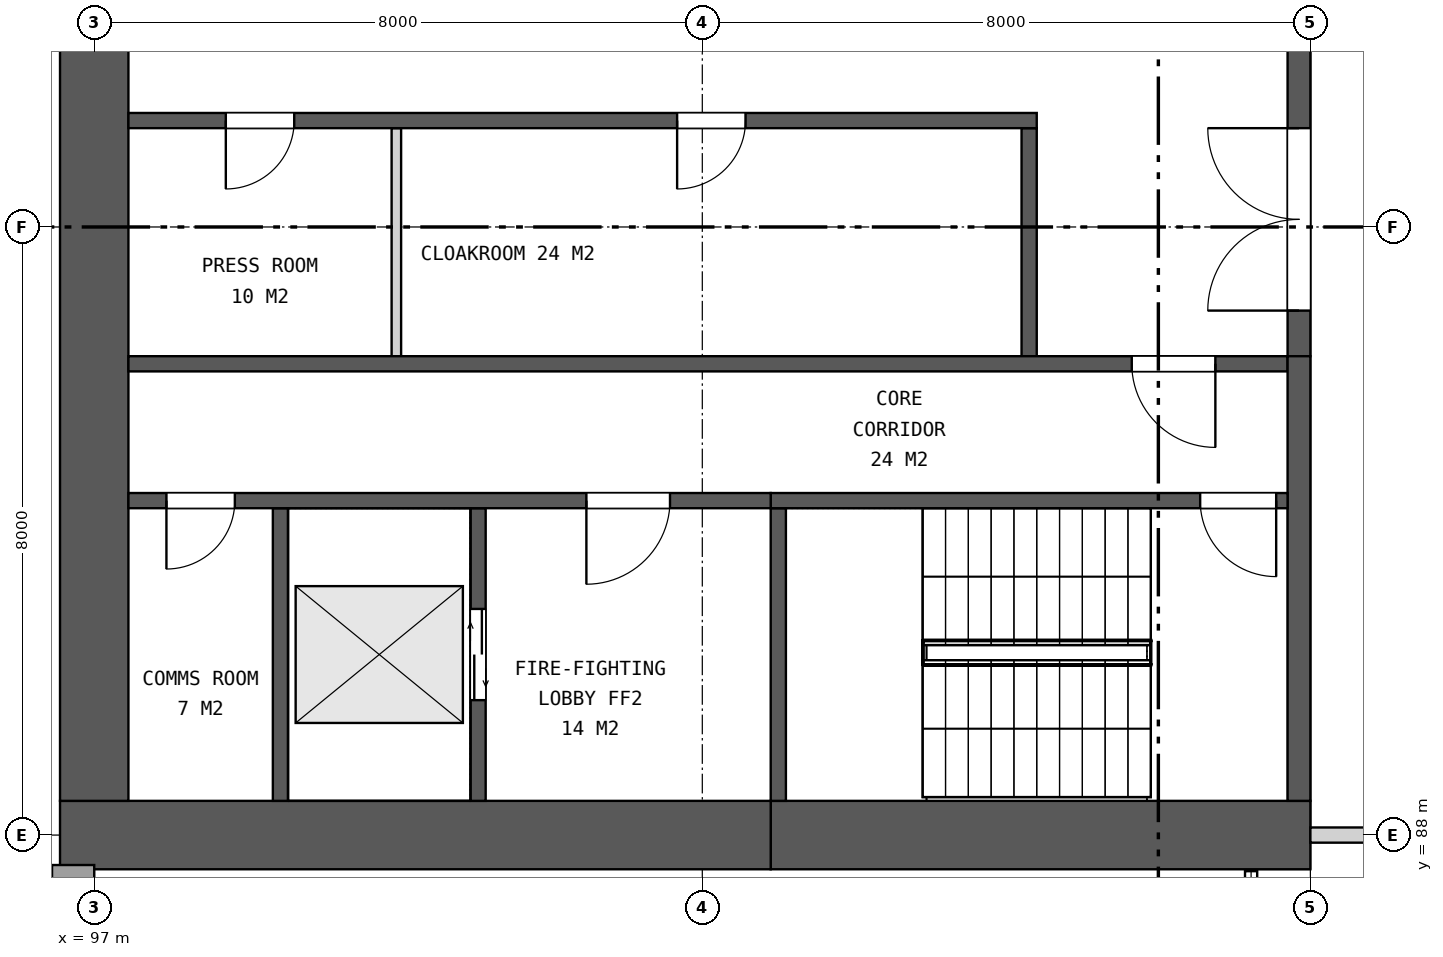
"""IFC4 building model, lengths in metres.
Left out: names, types, materials, properties, quantities, classifications, styles, units other than length and angle.
Written with IfcOpenShell. Run it as: python <this file> out.ifc"""

import sys

from ifc_helpers import new_model, si_unit, direction, frame, frame_2d, origin, place, context, subcontext, project, spatial, rectangle, extrude, element, fill, save


model = new_model("IFC4")
c1 = context("Model", 3, precision=1e-05, world=origin(), true_north=direction((0.0, 1.0)))
c2 = subcontext(c1, "Body", "Model", "MODEL_VIEW")
j1 = project(units=[si_unit("LENGTHUNIT", "METRE"), si_unit("PLANEANGLEUNIT", "RADIAN")], contexts=[c1])
p1 = place(None, origin())
s1 = spatial("IfcSite", under=j1, at=p1, CompositionType="ELEMENT")
p2 = place(p1, origin())
s2 = spatial("IfcBuilding", under=s1, at=p2, CompositionType="ELEMENT")
p3 = place(p2, frame((0.0, 0.0, 41.5)))
s3 = spatial("IfcBuildingStorey", under=s2, at=p3, CompositionType="ELEMENT", Elevation=41.5)
p4 = place(p3, frame((113.0, 88.0, 0.0), z_axis=(0.0, 0.0, 1.0), x_axis=(-1.0, 0.0, 0.0)))
e1 = element("IfcWall", 1, at=p4, inside=s3, PredefinedType="SHEAR", context=c2, shape_type="SweptSolid", body=[
    extrude(rectangle(XDim=7.1, YDim=0.9, at=frame_2d((3.55, 0.0))), origin(), (0.0, 0.0, 1.0), 6.0),
])
p5 = place(p3, frame((105.9, 88.0, 0.0), z_axis=(0.0, 0.0, 1.0), x_axis=(-1.0, 0.0, 0.0)))
e2 = element("IfcWall", 2, at=p5, inside=s3, PredefinedType="SHEAR", context=c2, shape_type="SweptSolid", body=[
    extrude(rectangle(XDim=9.35, YDim=0.9, at=frame_2d((4.675, 0.0))), origin(), (0.0, 0.0, 1.0), 6.0),
])
p6 = place(p3, frame((97.0, 111.55, 0.0), z_axis=(0.0, 0.0, 1.0), x_axis=(0.0, -1.0, 0.0)))
e3 = element("IfcWall", 3, at=p6, inside=s3, PredefinedType="SHEAR", context=c2, shape_type="SweptSolid", body=[
    extrude(rectangle(XDim=23.1, YDim=0.9, at=frame_2d((11.55, 0.0))), origin(), (0.0, 0.0, 1.0), 6.0),
])
p7 = place(p6, frame((10.35, 0.0, 0.0)))
e4 = element("IfcOpeningElement", 4, at=p7, cuts=e3, PredefinedType="OPENING", context=c2, shape_type="SweptSolid", body=[
    extrude(rectangle(XDim=2.4, YDim=2.4, at=frame_2d((1.2, 1.2))), frame((0.0, 0.46, 0.0), z_axis=(0.0, -1.0, 0.0), x_axis=(1.0, 0.0, 0.0)), (0.0, 0.0, 1.0), 0.92),
])
p8 = place(p3, frame((112.85, 105.7, 0.0), z_axis=(0.0, 0.0, 1.0), x_axis=(0.0, -1.0, 0.0)))
e5 = element("IfcWall", 5, at=p8, inside=s3, PredefinedType="SHEAR", context=c2, shape_type="SweptSolid", body=[
    extrude(rectangle(XDim=11.4, YDim=0.3, at=frame_2d((5.7, 0.0))), origin(), (0.0, 0.0, 1.0), 6.0),
])
p9 = place(p8, frame((0.6, 0.0, 0.0)))
e6 = element("IfcOpeningElement", 6, at=p9, cuts=e5, PredefinedType="OPENING", context=c2, shape_type="SweptSolid", body=[
    extrude(rectangle(XDim=2.4, YDim=2.4, at=frame_2d((1.2, 1.2))), frame((0.0, 0.16, 0.0), z_axis=(0.0, -1.0, 0.0), x_axis=(1.0, 0.0, 0.0)), (0.0, 0.0, 1.0), 0.32),
])
p10 = place(p8, frame((4.5, 0.0, 0.0)))
e7 = element("IfcOpeningElement", 7, at=p10, cuts=e5, PredefinedType="OPENING", context=c2, shape_type="SweptSolid", body=[
    extrude(rectangle(XDim=2.4, YDim=2.4, at=frame_2d((1.2, 1.2))), frame((0.0, 0.16, 0.0), z_axis=(0.0, -1.0, 0.0), x_axis=(1.0, 0.0, 0.0)), (0.0, 0.0, 1.0), 0.32),
])
p11 = place(p8, frame((8.4, 0.0, 0.0)))
e8 = element("IfcOpeningElement", 8, at=p11, cuts=e5, PredefinedType="OPENING", context=c2, shape_type="SweptSolid", body=[
    extrude(rectangle(XDim=2.4, YDim=2.4, at=frame_2d((1.2, 1.2))), frame((0.0, 0.16, 0.0), z_axis=(0.0, -1.0, 0.0), x_axis=(1.0, 0.0, 0.0)), (0.0, 0.0, 1.0), 0.32),
])
p12 = place(p3, frame((109.3, 97.3, 0.0), z_axis=(0.0, 0.0, 1.0), x_axis=(0.0, -1.0, 0.0)))
e9 = element("IfcWall", 9, at=p12, inside=s3, PredefinedType="SHEAR", context=c2, shape_type="SweptSolid", body=[
    extrude(rectangle(XDim=3.0, YDim=0.2, at=frame_2d((1.5, 0.0))), origin(), (0.0, 0.0, 1.0), 6.0),
])
p13 = place(p3, frame((100.975, 97.3, 0.0), z_axis=(0.0, 0.0, 1.0), x_axis=(0.0, -1.0, 0.0)))
e10 = element("IfcWall", 10, at=p13, inside=s3, PredefinedType="PARTITIONING", context=c2, shape_type="SweptSolid", body=[
    extrude(rectangle(XDim=3.0, YDim=0.125, at=frame_2d((1.5, 0.0))), origin(), (0.0, 0.0, 1.0), 6.0),
])
p14 = place(p3, frame((109.4, 97.4, 0.0), z_axis=(0.0, 0.0, 1.0), x_axis=(-1.0, 0.0, 0.0)))
e11 = element("IfcWall", 11, at=p14, inside=s3, PredefinedType="SHEAR", context=c2, shape_type="SweptSolid", body=[
    extrude(rectangle(XDim=11.95, YDim=0.2, at=frame_2d((5.975, 0.0))), origin(), (0.0, 0.0, 1.0), 6.0),
])
p15 = place(p14, frame((3.831, 0.0, 0.0)))
e12 = element("IfcOpeningElement", 12, at=p15, cuts=e11, PredefinedType="OPENING", context=c2, shape_type="SweptSolid", body=[
    extrude(rectangle(XDim=0.9, YDim=2.1, at=frame_2d((0.45, 1.05))), frame((0.0, 0.11, 0.0), z_axis=(0.0, -1.0, 0.0), x_axis=(1.0, 0.0, 0.0)), (0.0, 0.0, 1.0), 0.22),
])
p16 = place(p14, frame((9.769, 0.0, 0.0)))
e13 = element("IfcOpeningElement", 13, at=p16, cuts=e11, PredefinedType="OPENING", context=c2, shape_type="SweptSolid", body=[
    extrude(rectangle(XDim=0.9, YDim=2.1, at=frame_2d((0.45, 1.05))), frame((0.0, 0.11, 0.0), z_axis=(0.0, -1.0, 0.0), x_axis=(1.0, 0.0, 0.0)), (0.0, 0.0, 1.0), 0.22),
])
p17 = place(p3, frame((112.7, 94.2, 0.0), z_axis=(0.0, 0.0, 1.0), x_axis=(-1.0, 0.0, 0.0)))
e14 = element("IfcWall", 14, at=p17, inside=s3, PredefinedType="SHEAR", context=c2, shape_type="SweptSolid", body=[
    extrude(rectangle(XDim=15.25, YDim=0.2, at=frame_2d((7.625, 0.0))), origin(), (0.0, 0.0, 1.0), 6.0),
])
p18 = place(p17, frame((0.95, 0.0, 0.0)))
e15 = element("IfcOpeningElement", 15, at=p18, cuts=e14, PredefinedType="OPENING", context=c2, shape_type="SweptSolid", body=[
    extrude(rectangle(XDim=1.1, YDim=2.1, at=frame_2d((0.55, 1.05))), frame((0.0, 0.11, 0.0), z_axis=(0.0, -1.0, 0.0), x_axis=(1.0, 0.0, 0.0)), (0.0, 0.0, 1.0), 0.22),
])
p19 = place(p3, frame((112.85, 94.3, 0.0), z_axis=(0.0, 0.0, 1.0), x_axis=(0.0, -1.0, 0.0)))
e16 = element("IfcWall", 16, at=p19, inside=s3, PredefinedType="SHEAR", context=c2, shape_type="SweptSolid", body=[
    extrude(rectangle(XDim=5.85, YDim=0.3, at=frame_2d((2.925, 0.0))), origin(), (0.0, 0.0, 1.0), 6.0),
])
p20 = place(p3, frame((106.0, 92.3, 0.0), z_axis=(0.0, 0.0, 1.0), x_axis=(0.0, -1.0, 0.0)))
e17 = element("IfcWall", 17, at=p20, inside=s3, PredefinedType="SHEAR", context=c2, shape_type="SweptSolid", body=[
    extrude(rectangle(XDim=3.85, YDim=0.2, at=frame_2d((1.925, 0.0))), origin(), (0.0, 0.0, 1.0), 6.0),
])
p21 = place(p3, frame((102.05, 92.3, 0.0), z_axis=(0.0, 0.0, 1.0), x_axis=(0.0, -1.0, 0.0)))
e18 = element("IfcWall", 18, at=p21, inside=s3, PredefinedType="SHEAR", context=c2, shape_type="SweptSolid", body=[
    extrude(rectangle(XDim=3.85, YDim=0.2, at=frame_2d((1.925, 0.0))), origin(), (0.0, 0.0, 1.0), 6.0),
])
p22 = place(p21, frame((1.325, 0.0, 0.0)))
e19 = element("IfcOpeningElement", 19, at=p22, cuts=e18, PredefinedType="OPENING", context=c2, shape_type="SweptSolid", body=[
    extrude(rectangle(XDim=1.2, YDim=2.1, at=frame_2d((0.6, 1.05))), frame((0.0, 0.11, 0.0), z_axis=(0.0, -1.0, 0.0), x_axis=(1.0, 0.0, 0.0)), (0.0, 0.0, 1.0), 0.22),
])
p23 = place(p3, frame((99.45, 92.3, 0.0), z_axis=(0.0, 0.0, 1.0), x_axis=(0.0, -1.0, 0.0)))
e20 = element("IfcWall", 20, at=p23, inside=s3, PredefinedType="SHEAR", context=c2, shape_type="SweptSolid", body=[
    extrude(rectangle(XDim=3.85, YDim=0.2, at=frame_2d((1.925, 0.0))), origin(), (0.0, 0.0, 1.0), 6.0),
])
p24 = place(p3, frame((112.7, 92.4, 0.0), z_axis=(0.0, 0.0, 1.0), x_axis=(-1.0, 0.0, 0.0)))
e21 = element("IfcWall", 21, at=p24, inside=s3, PredefinedType="SHEAR", context=c2, shape_type="SweptSolid", body=[
    extrude(rectangle(XDim=6.8, YDim=0.2, at=frame_2d((3.4, 0.0))), origin(), (0.0, 0.0, 1.0), 6.0),
])
p25 = place(p24, frame((0.15, 0.0, 0.0)))
e22 = element("IfcOpeningElement", 22, at=p25, cuts=e21, PredefinedType="OPENING", context=c2, shape_type="SweptSolid", body=[
    extrude(rectangle(XDim=1.0, YDim=2.1, at=frame_2d((0.5, 1.05))), frame((0.0, 0.11, 0.0), z_axis=(0.0, -1.0, 0.0), x_axis=(1.0, 0.0, 0.0)), (0.0, 0.0, 1.0), 0.22),
])
p26 = place(p3, frame((105.9, 92.4, 0.0), z_axis=(0.0, 0.0, 1.0), x_axis=(-1.0, 0.0, 0.0)))
e23 = element("IfcWall", 23, at=p26, inside=s3, PredefinedType="SHEAR", context=c2, shape_type="SweptSolid", body=[
    extrude(rectangle(XDim=8.45, YDim=0.2, at=frame_2d((4.225, 0.0))), origin(), (0.0, 0.0, 1.0), 6.0),
])
p27 = place(p26, frame((1.325, 0.0, 0.0)))
e24 = element("IfcOpeningElement", 24, at=p27, cuts=e23, PredefinedType="OPENING", context=c2, shape_type="SweptSolid", body=[
    extrude(rectangle(XDim=1.1, YDim=2.1, at=frame_2d((0.55, 1.05))), frame((0.0, 0.11, 0.0), z_axis=(0.0, -1.0, 0.0), x_axis=(1.0, 0.0, 0.0)), (0.0, 0.0, 1.0), 0.22),
])
p28 = place(p26, frame((7.05, 0.0, 0.0)))
e25 = element("IfcOpeningElement", 25, at=p28, cuts=e23, PredefinedType="OPENING", context=c2, shape_type="SweptSolid", body=[
    extrude(rectangle(XDim=0.9, YDim=2.1, at=frame_2d((0.45, 1.05))), frame((0.0, 0.11, 0.0), z_axis=(0.0, -1.0, 0.0), x_axis=(1.0, 0.0, 0.0)), (0.0, 0.0, 1.0), 0.22),
])
p29 = place(p3, frame((96.445, 87.453, 0.0), z_axis=(0.0, 0.0, 1.0), x_axis=(1.0, 0.0, 0.0)))
e26 = element("IfcWall", 26, at=p29, inside=s3, PredefinedType="SOLIDWALL", context=c2, shape_type="SweptSolid", body=[
    extrude(rectangle(XDim=0.555, YDim=0.306, at=frame_2d((0.277, 0.0))), origin(), (0.0, 0.0, 1.0), 5.6),
])
p30 = place(p3, frame((113.0, 88.0, 0.0), z_axis=(0.0, 0.0, 1.0), x_axis=(1.0, 0.0, 0.0)))
e27 = element("IfcWall", 27, at=p30, inside=s3, PredefinedType="PARTITIONING", context=c2, shape_type="SweptSolid", body=[
    extrude(rectangle(XDim=7.4, YDim=0.2, at=frame_2d((3.7, 0.0))), origin(), (0.0, 0.0, 1.0), 5.055),
])
p31 = place(p11, frame((2.4, 0.0, 0.0), z_axis=(0.0, 0.0, 1.0), x_axis=(-1.0, 0.0, 0.0)))
e28 = element("IfcDoor", 28, at=p31, inside=s3, OperationType="DOUBLE_DOOR_SINGLE_SWING", PredefinedType="DOOR", context=c2, shape_type="SweptSolid", body=[
    extrude(rectangle(XDim=2.4, YDim=2.4, at=frame_2d((1.2, 1.2))), frame((0.0, 0.025, 0.0), z_axis=(0.0, -1.0, 0.0), x_axis=(1.0, 0.0, 0.0)), (0.0, 0.0, 1.0), 0.05),
])
fill(e8, e28)
p32 = place(p15, origin())
e29 = element("IfcDoor", 29, at=p32, inside=s3, OperationType="SINGLE_SWING_RIGHT", PredefinedType="DOOR", context=c2, shape_type="SweptSolid", body=[
    extrude(rectangle(XDim=0.9, YDim=2.1, at=frame_2d((0.45, 1.05))), frame((0.0, 0.025, 0.0), z_axis=(0.0, -1.0, 0.0), x_axis=(1.0, 0.0, 0.0)), (0.0, 0.0, 1.0), 0.05),
])
fill(e12, e29)
p33 = place(p16, origin())
e30 = element("IfcDoor", 30, at=p33, inside=s3, OperationType="SINGLE_SWING_RIGHT", PredefinedType="DOOR", context=c2, shape_type="SweptSolid", body=[
    extrude(rectangle(XDim=0.9, YDim=2.1, at=frame_2d((0.45, 1.05))), frame((0.0, 0.025, 0.0), z_axis=(0.0, -1.0, 0.0), x_axis=(1.0, 0.0, 0.0)), (0.0, 0.0, 1.0), 0.05),
])
fill(e13, e30)
p34 = place(p18, origin())
e31 = element("IfcDoor", 31, at=p34, inside=s3, OperationType="SINGLE_SWING_LEFT", PredefinedType="DOOR", context=c2, shape_type="SweptSolid", body=[
    extrude(rectangle(XDim=1.1, YDim=2.1, at=frame_2d((0.55, 1.05))), frame((0.0, 0.025, 0.0), z_axis=(0.0, -1.0, 0.0), x_axis=(1.0, 0.0, 0.0)), (0.0, 0.0, 1.0), 0.05),
])
fill(e15, e31)
p35 = place(p22, origin())
e32 = element("IfcDoor", 32, at=p35, inside=s3, OperationType="DOUBLE_DOOR_SLIDING", PredefinedType="DOOR", context=c2, shape_type="SweptSolid", body=[
    extrude(rectangle(XDim=1.2, YDim=2.1, at=frame_2d((0.6, 1.05))), frame((0.0, 0.025, 0.0), z_axis=(0.0, -1.0, 0.0), x_axis=(1.0, 0.0, 0.0)), (0.0, 0.0, 1.0), 0.05),
])
fill(e19, e32)
p36 = place(p25, origin())
e33 = element("IfcDoor", 33, at=p36, inside=s3, OperationType="SINGLE_SWING_LEFT", PredefinedType="DOOR", context=c2, shape_type="SweptSolid", body=[
    extrude(rectangle(XDim=1.0, YDim=2.1, at=frame_2d((0.5, 1.05))), frame((0.0, 0.025, 0.0), z_axis=(0.0, -1.0, 0.0), x_axis=(1.0, 0.0, 0.0)), (0.0, 0.0, 1.0), 0.05),
])
fill(e22, e33)
p37 = place(p27, origin())
e34 = element("IfcDoor", 34, at=p37, inside=s3, OperationType="SINGLE_SWING_RIGHT", PredefinedType="DOOR", context=c2, shape_type="SweptSolid", body=[
    extrude(rectangle(XDim=1.1, YDim=2.1, at=frame_2d((0.55, 1.05))), frame((0.0, 0.025, 0.0), z_axis=(0.0, -1.0, 0.0), x_axis=(1.0, 0.0, 0.0)), (0.0, 0.0, 1.0), 0.05),
])
fill(e24, e34)
p38 = place(p28, origin())
e35 = element("IfcDoor", 35, at=p38, inside=s3, OperationType="SINGLE_SWING_RIGHT", PredefinedType="DOOR", context=c2, shape_type="SweptSolid", body=[
    extrude(rectangle(XDim=0.9, YDim=2.1, at=frame_2d((0.45, 1.05))), frame((0.0, 0.025, 0.0), z_axis=(0.0, -1.0, 0.0), x_axis=(1.0, 0.0, 0.0)), (0.0, 0.0, 1.0), 0.05),
])
fill(e25, e35)
save(model, sys.argv[1])
